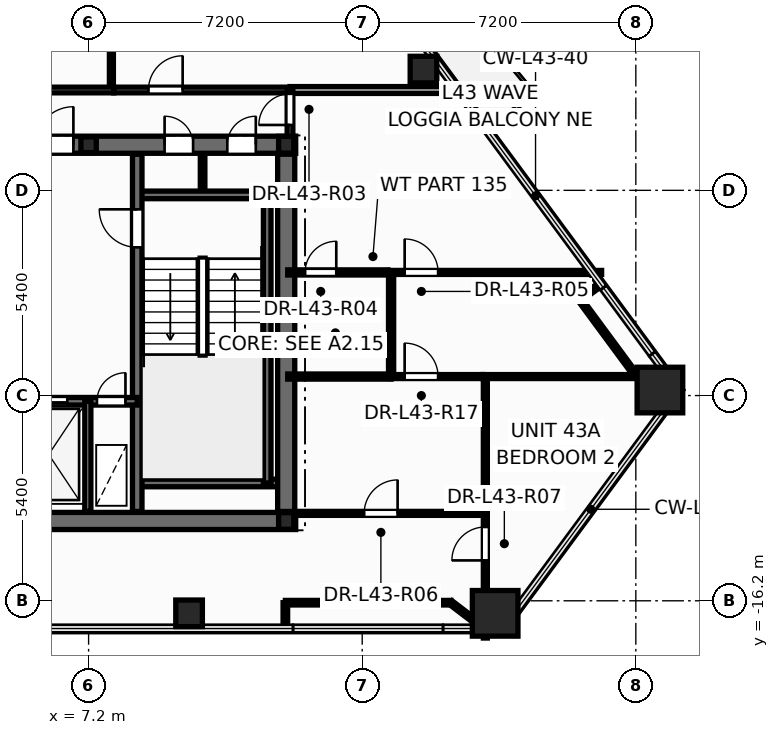
"""IFC4 building model, lengths in metres.
Left out: names, types, materials, properties, quantities, classifications, styles, units other than length and angle.
Written with IfcOpenShell. Run it as: python <this file> out.ifc"""

import sys

from ifc_helpers import new_model, si_unit, direction, frame, frame_2d, origin, origin_2d, place, context, subcontext, project, spatial, rectangle, hollow_rectangle, hollow_circle, i_section, extrude, element, fill, save


model = new_model("IFC4")
c1 = context("Model", 3, precision=1e-05, world=origin(), true_north=direction((0.0, 1.0)))
c2 = subcontext(c1, "Body", "Model", "MODEL_VIEW")
j1 = project(units=[si_unit("LENGTHUNIT", "METRE"), si_unit("PLANEANGLEUNIT", "RADIAN")], contexts=[c1])
p1 = place(None, origin())
s1 = spatial("IfcSite", under=j1, at=p1, CompositionType="ELEMENT")
p2 = place(p1, origin())
s2 = spatial("IfcBuilding", under=s1, at=p2, CompositionType="ELEMENT")
p3 = place(p2, frame((0.0, 0.0, 165.3)))
s3 = spatial("IfcBuildingStorey", under=s2, at=p3, CompositionType="ELEMENT", Elevation=165.3)
for number, where, z_axis, x_axis in (
    (1, (17.898, -16.53, 0.0), (0.0, 0.0, 1.0), (1.0, 0.0, 0.0)),
    (2, (22.234, -10.655, 0.0), (0.0, 0.0, 1.0), (1.0, 0.0, 0.0)),
):
    element("IfcColumn", number, at=place(p3, frame(where, z_axis=z_axis, x_axis=x_axis)), inside=s3, PredefinedType="COLUMN", context=c2, shape_type="SweptSolid", body=[
        extrude(hollow_rectangle(XDim=1.2, YDim=1.2, WallThickness=0.055, at=origin_2d()), origin(), (0.0, 0.0, 1.0), 3.6),
    ])
for number, where, z_axis, x_axis in (
    (3, (9.844, -16.53, 0.0), (0.0, 0.0, 1.0), (1.0, 0.0, 0.0)),
    (4, (16.012, -2.223, 0.0), (0.0, 0.0, 1.0), (1.0, 0.0, 0.0)),
):
    element("IfcColumn", number, at=place(p3, frame(where, z_axis=z_axis, x_axis=x_axis)), inside=s3, PredefinedType="COLUMN", context=c2, shape_type="SweptSolid", body=[
        extrude(hollow_circle(Radius=0.35, WallThickness=0.03, at=origin_2d()), origin(), (0.0, 0.0, 1.0), 3.6),
    ])
for number, where, z_axis, x_axis in (
    (5, (12.4, -14.1, 0.0), (0.0, 0.0, 1.0), (1.0, 0.0, 0.0)),
    (6, (12.4, -4.2, 0.0), (0.0, 0.0, 1.0), (1.0, 0.0, 0.0)),
):
    element("IfcColumn", number, at=place(p3, frame(where, z_axis=z_axis, x_axis=x_axis)), inside=s3, PredefinedType="COLUMN", context=c2, shape_type="SweptSolid", body=[
        extrude(i_section(OverallWidth=0.4, OverallDepth=0.44, WebThickness=0.028, FlangeThickness=0.04, at=origin_2d()), origin(), (0.0, 0.0, 1.0), 3.6),
    ])
p4 = place(p3, frame((7.2, -4.2, 0.0), z_axis=(0.0, 0.0, 1.0), x_axis=(1.0, 0.0, 0.0)))
e7 = element("IfcColumn", 7, at=p4, inside=s3, PredefinedType="PILASTER", context=c2, shape_type="SweptSolid", body=[
    extrude(i_section(OverallWidth=0.405, OverallDepth=0.414, WebThickness=0.022, FlangeThickness=0.032, at=origin_2d()), origin(), (0.0, 0.0, 1.0), 3.6),
])
p5 = place(p3, frame((10.2, -5.52, 0.0), z_axis=(0.0, 0.0, 1.0), x_axis=(0.0, 1.0, 0.0)))
e8 = element("IfcWall", 8, at=p5, inside=s3, PredefinedType="PARTITIONING", context=c2, shape_type="SweptSolid", body=[
    extrude(rectangle(XDim=1.12, YDim=0.12, at=frame_2d((0.56, 0.0))), origin(), (0.0, 0.0, 1.0), 3.28),
])
p6 = place(p3, frame((-12.65, -14.1, 0.0), z_axis=(0.0, 0.0, 1.0), x_axis=(1.0, 0.0, 0.0)))
e9 = element("IfcWall", 9, at=p6, inside=s3, PredefinedType="SHEAR", context=c2, shape_type="SweptSolid", body=[
    extrude(rectangle(XDim=25.3, YDim=0.45, at=frame_2d((12.65, 0.0))), origin(), (0.0, 0.0, 1.0), 3.6),
])
p7 = place(p3, frame((-12.65, -4.2, 0.0), z_axis=(0.0, 0.0, 1.0), x_axis=(1.0, 0.0, 0.0)))
e10 = element("IfcWall", 10, at=p7, inside=s3, PredefinedType="SHEAR", context=c2, shape_type="SweptSolid", body=[
    extrude(rectangle(XDim=25.3, YDim=0.45, at=frame_2d((12.65, 0.0))), origin(), (0.0, 0.0, 1.0), 3.6),
])
p8 = place(p7, frame((1.85, 0.0, 0.0)))
e11 = element("IfcOpeningElement", 11, at=p8, cuts=e10, PredefinedType="OPENING", context=c2, shape_type="SweptSolid", body=[
    extrude(rectangle(XDim=0.756, YDim=2.054, at=frame_2d((0.375, 1.027))), frame((0.0, 0.235, 0.0), z_axis=(0.0, -1.0, 0.0), x_axis=(1.0, 0.0, 0.0)), (0.0, 0.0, 1.0), 0.47),
])
p9 = place(p7, frame((21.85, 0.0, 0.0)))
e12 = element("IfcOpeningElement", 12, at=p9, cuts=e10, PredefinedType="OPENING", context=c2, shape_type="SweptSolid", body=[
    extrude(rectangle(XDim=0.756, YDim=2.054, at=frame_2d((0.375, 1.027))), frame((0.0, 0.235, 0.0), z_axis=(0.0, -1.0, 0.0), x_axis=(1.0, 0.0, 0.0)), (0.0, 0.0, 1.0), 0.47),
])
p10 = place(p7, frame((23.5, 0.0, 0.0)))
e13 = element("IfcOpeningElement", 13, at=p10, cuts=e10, PredefinedType="OPENING", context=c2, shape_type="SweptSolid", body=[
    extrude(rectangle(XDim=0.756, YDim=2.054, at=frame_2d((0.375, 1.027))), frame((0.0, 0.235, 0.0), z_axis=(0.0, -1.0, 0.0), x_axis=(1.0, 0.0, 0.0)), (0.0, 0.0, 1.0), 0.47),
])
p11 = place(p7, frame((5.85, 0.0, 0.0)))
e14 = element("IfcOpeningElement", 14, at=p11, cuts=e10, PredefinedType="OPENING", context=c2, shape_type="SweptSolid", body=[
    extrude(rectangle(XDim=1.006, YDim=2.104, at=frame_2d((0.5, 1.052))), frame((0.0, 0.235, 0.0), z_axis=(0.0, -1.0, 0.0), x_axis=(1.0, 0.0, 0.0)), (0.0, 0.0, 1.0), 0.47),
])
p12 = place(p7, frame((10.35, 0.0, 0.0)))
e15 = element("IfcOpeningElement", 15, at=p12, cuts=e10, PredefinedType="OPENING", context=c2, shape_type="SweptSolid", body=[
    extrude(rectangle(XDim=1.406, YDim=2.154, at=frame_2d((0.7, 1.077))), frame((0.0, 0.235, 0.0), z_axis=(0.0, -1.0, 0.0), x_axis=(1.0, 0.0, 0.0)), (0.0, 0.0, 1.0), 0.47),
])
p13 = place(p7, frame((18.45, 0.0, 0.0)))
e16 = element("IfcOpeningElement", 16, at=p13, cuts=e10, PredefinedType="OPENING", context=c2, shape_type="SweptSolid", body=[
    extrude(rectangle(XDim=1.006, YDim=2.104, at=frame_2d((0.5, 1.052))), frame((0.0, 0.235, 0.0), z_axis=(0.0, -1.0, 0.0), x_axis=(1.0, 0.0, 0.0)), (0.0, 0.0, 1.0), 0.47),
])
for number, where, z_axis, x_axis in (
    (17, (8.48, -5.52, 0.0), (0.0, 0.0, 1.0), (1.0, 0.0, 0.0)),
    (18, (8.48, -13.1, 0.0), (0.0, 0.0, 1.0), (1.0, 0.0, 0.0)),
):
    element("IfcWall", number, at=place(p3, frame(where, z_axis=z_axis, x_axis=x_axis)), inside=s3, PredefinedType="SOLIDWALL", context=c2, shape_type="SweptSolid", body=[
        extrude(rectangle(XDim=3.87, YDim=0.2, at=frame_2d((1.935, 0.0))), origin(), (0.0, 0.0, 1.0), 3.6),
    ])
p14 = place(p3, frame((11.9, -13.1, 0.0), z_axis=(0.0, 0.0, 1.0), x_axis=(0.0, 1.0, 0.0)))
e19 = element("IfcWall", 19, at=p14, inside=s3, PredefinedType="SOLIDWALL", context=c2, shape_type="SweptSolid", body=[
    extrude(rectangle(XDim=7.58, YDim=0.2, at=frame_2d((3.79, 0.0))), origin(), (0.0, 0.0, 1.0), 3.6),
])
p15 = place(p3, frame((8.48, -13.85, 0.0), z_axis=(0.0, 0.0, 1.0), x_axis=(0.0, 1.0, 0.0)))
e20 = element("IfcWall", 20, at=p15, inside=s3, PredefinedType="SHEAR", context=c2, shape_type="SweptSolid", body=[
    extrude(rectangle(XDim=9.4, YDim=0.25, at=frame_2d((4.7, 0.0))), origin(), (0.0, 0.0, 1.0), 3.6),
])
p16 = place(p15, frame((6.95, 0.0, 0.0)))
e21 = element("IfcOpeningElement", 21, at=p16, cuts=e20, PredefinedType="OPENING", context=c2, shape_type="SweptSolid", body=[
    extrude(rectangle(XDim=1.006, YDim=2.104, at=frame_2d((0.5, 1.052))), frame((0.0, 0.135, 0.0), z_axis=(0.0, -1.0, 0.0), x_axis=(1.0, 0.0, 0.0)), (0.0, 0.0, 1.0), 0.27),
])
p17 = place(p3, frame((5.12, -10.95, 0.0), z_axis=(0.0, 0.0, 1.0), x_axis=(1.0, 0.0, 0.0)))
e22 = element("IfcWall", 22, at=p17, inside=s3, PredefinedType="SOLIDWALL", context=c2, shape_type="SweptSolid", body=[
    extrude(rectangle(XDim=3.36, YDim=0.2, at=frame_2d((1.68, 0.0))), origin(), (0.0, 0.0, 1.0), 3.6),
])
p18 = place(p17, frame((0.42, 0.0, 0.0)))
e23 = element("IfcOpeningElement", 23, at=p18, cuts=e22, PredefinedType="OPENING", context=c2, shape_type="SweptSolid", body=[
    extrude(rectangle(XDim=1.106, YDim=2.104, at=frame_2d((0.55, 1.052))), frame((0.0, 0.11, 0.0), z_axis=(0.0, -1.0, 0.0), x_axis=(1.0, 0.0, 0.0)), (0.0, 0.0, 1.0), 0.22),
])
p19 = place(p17, frame((2.3, 0.0, 0.0)))
e24 = element("IfcOpeningElement", 24, at=p19, cuts=e22, PredefinedType="OPENING", context=c2, shape_type="SweptSolid", body=[
    extrude(rectangle(XDim=0.756, YDim=2.054, at=frame_2d((0.375, 1.027))), frame((0.0, 0.11, 0.0), z_axis=(0.0, -1.0, 0.0), x_axis=(1.0, 0.0, 0.0)), (0.0, 0.0, 1.0), 0.22),
])
p20 = place(p3, frame((7.18, -13.85, 0.0), z_axis=(0.0, 0.0, 1.0), x_axis=(0.0, 1.0, 0.0)))
e25 = element("IfcWall", 25, at=p20, inside=s3, PredefinedType="PARTITIONING", context=c2, shape_type="SweptSolid", body=[
    extrude(rectangle(XDim=2.9, YDim=0.16, at=frame_2d((1.45, 0.0))), origin(), (0.0, 0.0, 1.0), 2.405),
])
p21 = place(p3, frame((12.4, -13.85, 0.0), z_axis=(0.0, 0.0, 1.0), x_axis=(0.0, 1.0, 0.0)))
e26 = element("IfcWall", 26, at=p21, inside=s3, PredefinedType="SHEAR", context=c2, shape_type="SweptSolid", body=[
    extrude(rectangle(XDim=9.4, YDim=0.45, at=frame_2d((4.7, 0.0))), origin(), (0.0, 0.0, 1.0), 3.6),
])
p22 = place(p3, frame((7.8, -2.76, 0.0), z_axis=(0.0, 0.0, 1.0), x_axis=(0.0, 1.0, 0.0)))
e27 = element("IfcWall", 27, at=p22, inside=s3, PredefinedType="PARTITIONING", context=c2, shape_type="SweptSolid", body=[
    extrude(rectangle(XDim=12.338, YDim=0.105, at=frame_2d((6.169, 0.0))), origin(), (0.0, 0.0, 1.0), 2.547),
])
p23 = place(p3, frame((15.08, -7.56, 0.0), z_axis=(0.0, 0.0, 1.0), x_axis=(1.0, 0.0, 0.0)))
e28 = element("IfcWall", 28, at=p23, inside=s3, PredefinedType="PARTITIONING", context=c2, shape_type="SweptSolid", body=[
    extrude(rectangle(XDim=5.62, YDim=0.105, at=frame_2d((2.81, 0.0))), origin(), (0.0, 0.0, 1.0), 2.255),
])
p24 = place(p23, frame((0.437, 0.0, 0.0)))
e29 = element("IfcOpeningElement", 29, at=p24, cuts=e28, PredefinedType="OPENING", context=c2, shape_type="SweptSolid", body=[
    extrude(rectangle(XDim=0.886, YDim=2.104, at=frame_2d((0.44, 1.052))), frame((0.0, 0.062, 0.0), z_axis=(0.0, -1.0, 0.0), x_axis=(1.0, 0.0, 0.0)), (0.0, 0.0, 1.0), 0.125),
])
p25 = place(p3, frame((2.36, -2.76, 0.0), z_axis=(0.0, 0.0, 1.0), x_axis=(1.0, 0.0, 0.0)))
e30 = element("IfcWall", 30, at=p25, inside=s3, PredefinedType="PARTITIONING", context=c2, shape_type="SweptSolid", body=[
    extrude(rectangle(XDim=5.5, YDim=0.15, at=frame_2d((2.75, 0.0))), origin(), (0.0, 0.0, 1.0), 2.255),
])
p26 = place(p3, frame((12.652, -13.9, 0.0), z_axis=(0.0, 0.0, 1.0), x_axis=(1.0, 0.0, 0.0)))
e31 = element("IfcWall", 31, at=p26, inside=s3, PredefinedType="PARTITIONING", context=c2, shape_type="SweptSolid", body=[
    extrude(rectangle(XDim=4.988, YDim=0.105, at=frame_2d((2.494, 0.0))), origin(), (0.0, 0.0, 1.0), 3.28),
])
p27 = place(p26, frame((1.8, 0.0, 0.0)))
e32 = element("IfcOpeningElement", 32, at=p27, cuts=e31, PredefinedType="OPENING", context=c2, shape_type="SweptSolid", body=[
    extrude(rectangle(XDim=0.886, YDim=2.104, at=frame_2d((0.44, 1.052))), frame((0.0, 0.062, 0.0), z_axis=(0.0, -1.0, 0.0), x_axis=(1.0, 0.0, 0.0)), (0.0, 0.0, 1.0), 0.125),
])
p28 = place(p3, frame((7.862, -2.76, 0.0), z_axis=(0.0, 0.0, 1.0), x_axis=(1.0, 0.0, 0.0)))
e33 = element("IfcWall", 33, at=p28, inside=s3, PredefinedType="PARTITIONING", context=c2, shape_type="SweptSolid", body=[
    extrude(rectangle(XDim=4.638, YDim=0.15, at=frame_2d((2.319, 0.0))), origin(), (0.0, 0.0, 1.0), 3.28),
])
p29 = place(p28, frame((0.913, 0.0, 0.0)))
e34 = element("IfcOpeningElement", 34, at=p29, cuts=e33, PredefinedType="OPENING", context=c2, shape_type="SweptSolid", body=[
    extrude(rectangle(XDim=0.906, YDim=2.104, at=frame_2d((0.45, 1.052))), frame((0.0, 0.085, 0.0), z_axis=(0.0, -1.0, 0.0), x_axis=(1.0, 0.0, 0.0)), (0.0, 0.0, 1.0), 0.17),
])
p30 = place(p3, frame((17.58, -10.3, 0.0), z_axis=(0.0, 0.0, 1.0), x_axis=(1.0, 0.0, 0.0)))
e35 = element("IfcWall", 35, at=p30, inside=s3, PredefinedType="PARTITIONING", context=c2, shape_type="SweptSolid", body=[
    extrude(rectangle(XDim=4.64, YDim=0.105, at=frame_2d((2.32, 0.0))), origin(), (0.0, 0.0, 1.0), 2.255),
])
p31 = place(p3, frame((12.5, -2.76, 0.0), z_axis=(0.0, 0.0, 1.0), x_axis=(1.0, 0.0, 0.0)))
e36 = element("IfcWall", 36, at=p31, inside=s3, PredefinedType="PARTITIONING", context=c2, shape_type="SweptSolid", body=[
    extrude(rectangle(XDim=4.405, YDim=0.18, at=frame_2d((2.203, 0.0))), origin(), (0.0, 0.0, 1.0), 2.722),
])
p32 = place(p3, frame((12.378, -16.25, 0.0), z_axis=(0.0, 0.0, 1.0), x_axis=(1.0, 0.0, 0.0)))
e37 = element("IfcWall", 37, at=p32, inside=s3, PredefinedType="PARTITIONING", context=c2, shape_type="SweptSolid", body=[
    extrude(rectangle(XDim=4.354, YDim=0.12, at=frame_2d((2.177, 0.0))), origin(), (0.0, 0.0, 1.0), 3.28),
])
p33 = place(p3, frame((17.64, -13.9, 0.0), z_axis=(0.0, 0.0, 1.0), x_axis=(0.0, 1.0, 0.0)))
e38 = element("IfcWall", 38, at=p33, inside=s3, PredefinedType="PARTITIONING", context=c2, shape_type="SweptSolid", body=[
    extrude(rectangle(XDim=3.6, YDim=0.105, at=frame_2d((1.8, 0.0))), origin(), (0.0, 0.0, 1.0), 3.28),
])
p34 = place(p3, frame((17.64, -17.18, 0.0), z_axis=(0.0, 0.0, 1.0), x_axis=(0.0, 1.0, 0.0)))
e39 = element("IfcWall", 39, at=p34, inside=s3, PredefinedType="PARTITIONING", context=c2, shape_type="SweptSolid", body=[
    extrude(rectangle(XDim=3.28, YDim=0.105, at=frame_2d((1.64, 0.0))), origin(), (0.0, 0.0, 1.0), 2.722),
])
p35 = place(p34, frame((2.042, 0.0, 0.0)))
e40 = element("IfcOpeningElement", 40, at=p35, cuts=e39, PredefinedType="OPENING", context=c2, shape_type="SweptSolid", body=[
    extrude(rectangle(XDim=0.886, YDim=2.104, at=frame_2d((0.44, 1.052))), frame((0.0, 0.062, 0.0), z_axis=(0.0, -1.0, 0.0), x_axis=(1.0, 0.0, 0.0)), (0.0, 0.0, 1.0), 0.125),
])
p36 = place(p3, frame((12.44, -7.56, 0.0), z_axis=(0.0, 0.0, 1.0), x_axis=(1.0, 0.0, 0.0)))
e41 = element("IfcWall", 41, at=p36, inside=s3, PredefinedType="PARTITIONING", context=c2, shape_type="SweptSolid", body=[
    extrude(rectangle(XDim=2.638, YDim=0.135, at=frame_2d((1.319, 0.0))), origin(), (0.0, 0.0, 1.0), 2.722),
])
p37 = place(p36, frame((0.458, 0.0, 0.0)))
e42 = element("IfcOpeningElement", 42, at=p37, cuts=e41, PredefinedType="OPENING", context=c2, shape_type="SweptSolid", body=[
    extrude(rectangle(XDim=0.826, YDim=2.104, at=frame_2d((0.41, 1.052))), frame((0.0, 0.078, 0.0), z_axis=(0.0, -1.0, 0.0), x_axis=(1.0, 0.0, 0.0)), (0.0, 0.0, 1.0), 0.155),
])
p38 = place(p3, frame((15.16, -10.3, 0.0), z_axis=(0.0, 0.0, 1.0), x_axis=(0.0, 1.0, 0.0)))
e43 = element("IfcWall", 43, at=p38, inside=s3, PredefinedType="PARTITIONING", context=c2, shape_type="SweptSolid", body=[
    extrude(rectangle(XDim=2.74, YDim=0.135, at=frame_2d((1.37, 0.0))), origin(), (0.0, 0.0, 1.0), 3.28),
])
p39 = place(p3, frame((12.44, -10.3, 0.0), z_axis=(0.0, 0.0, 1.0), x_axis=(1.0, 0.0, 0.0)))
e44 = element("IfcWall", 44, at=p39, inside=s3, PredefinedType="PARTITIONING", context=c2, shape_type="SweptSolid", body=[
    extrude(rectangle(XDim=2.72, YDim=0.135, at=frame_2d((1.36, 0.0))), origin(), (0.0, 0.0, 1.0), 2.722),
])
p40 = place(p3, frame((15.16, -10.3, 0.0), z_axis=(0.0, 0.0, 1.0), x_axis=(1.0, 0.0, 0.0)))
e45 = element("IfcWall", 45, at=p40, inside=s3, PredefinedType="PARTITIONING", context=c2, shape_type="SweptSolid", body=[
    extrude(rectangle(XDim=2.418, YDim=0.105, at=frame_2d((1.209, 0.0))), origin(), (0.0, 0.0, 1.0), 3.28),
])
p41 = place(p40, frame((0.357, 0.0, 0.0)))
e46 = element("IfcOpeningElement", 46, at=p41, cuts=e45, PredefinedType="OPENING", context=c2, shape_type="SweptSolid", body=[
    extrude(rectangle(XDim=0.886, YDim=2.104, at=frame_2d((0.44, 1.052))), frame((0.0, 0.062, 0.0), z_axis=(0.0, -1.0, 0.0), x_axis=(1.0, 0.0, 0.0)), (0.0, 0.0, 1.0), 0.125),
])
p42 = place(p3, frame((21.554, -10.205, 0.0), z_axis=(0.0, 0.0, 1.0), x_axis=(-0.593742732842, 0.804654936726, 0.0)))
e47 = element("IfcWall", 47, at=p42, inside=s3, PredefinedType="PARTITIONING", context=c2, shape_type="SweptSolid", body=[
    extrude(rectangle(XDim=2.404, YDim=0.12, at=frame_2d((1.202, 0.0))), origin(), (0.0, 0.0, 1.0), 2.255),
])
p43 = place(p3, frame((12.5, -4.24, 0.0), z_axis=(0.0, 0.0, 1.0), x_axis=(0.0, 1.0, 0.0)))
e48 = element("IfcWall", 48, at=p43, inside=s3, PredefinedType="PARTITIONING", context=c2, shape_type="SweptSolid", body=[
    extrude(rectangle(XDim=1.48, YDim=0.15, at=frame_2d((0.74, 0.0))), origin(), (0.0, 0.0, 1.0), 2.255),
])
p44 = place(p43, frame((0.56, 0.0, 0.0)))
e49 = element("IfcOpeningElement", 49, at=p44, cuts=e48, PredefinedType="OPENING", context=c2, shape_type="SweptSolid", body=[
    extrude(rectangle(XDim=0.826, YDim=2.104, at=frame_2d((0.41, 1.052))), frame((0.0, 0.085, 0.0), z_axis=(0.0, -1.0, 0.0), x_axis=(1.0, 0.0, 0.0)), (0.0, 0.0, 1.0), 0.17),
])
p45 = place(p3, frame((16.731, -16.25, 0.0), z_axis=(0.0, 0.0, 1.0), x_axis=(0.794820504859, -0.606844597122, 0.0)))
e50 = element("IfcWall", 50, at=p45, inside=s3, PredefinedType="PARTITIONING", context=c2, shape_type="SweptSolid", body=[
    extrude(rectangle(XDim=0.853, YDim=0.12, at=frame_2d((0.427, 0.0))), origin(), (0.0, 0.0, 1.0), 2.722),
])
for number, where, z_axis, x_axis in (
    (51, (20.127, -8.271, 0.0), (0.0, 0.0, 1.0), (0.805, 0.594, 0.0)),
    (52, (12.378, -16.92, 0.0), (0.0, 0.0, 1.0), (0.0, 1.0, 0.0)),
):
    element("IfcWall", number, at=place(p3, frame(where, z_axis=z_axis, x_axis=x_axis)), inside=s3, PredefinedType="PARTITIONING", context=c2, shape_type="SweptSolid", body=[
        extrude(rectangle(XDim=0.67, YDim=0.12, at=frame_2d((0.335, 0.0))), origin(), (0.0, 0.0, 1.0), 2.722),
    ])
p46 = place(p16, origin())
e53 = element("IfcDoor", 53, at=p46, inside=s3, OperationType="SINGLE_SWING_RIGHT", PredefinedType="DOOR", context=c2, shape_type="SweptSolid", body=[
    extrude(rectangle(XDim=1.0, YDim=2.1, at=frame_2d((0.5, 1.05))), frame((0.0, 0.025, 0.0), z_axis=(0.0, -1.0, 0.0), x_axis=(1.0, 0.0, 0.0)), (0.0, 0.0, 1.0), 0.05),
])
fill(e21, e53)
p47 = place(p18, origin())
e54 = element("IfcDoor", 54, at=p47, inside=s3, OperationType="DOUBLE_DOOR_SLIDING", PredefinedType="DOOR", context=c2, shape_type="SweptSolid", body=[
    extrude(rectangle(XDim=1.1, YDim=2.1, at=frame_2d((0.55, 1.05))), frame((0.0, 0.025, 0.0), z_axis=(0.0, -1.0, 0.0), x_axis=(1.0, 0.0, 0.0)), (0.0, 0.0, 1.0), 0.05),
])
fill(e23, e54)
p48 = place(p19, origin())
e55 = element("IfcDoor", 55, at=p48, inside=s3, OperationType="SINGLE_SWING_RIGHT", PredefinedType="DOOR", context=c2, shape_type="SweptSolid", body=[
    extrude(rectangle(XDim=0.75, YDim=2.05, at=frame_2d((0.375, 1.025))), frame((0.0, 0.025, 0.0), z_axis=(0.0, -1.0, 0.0), x_axis=(1.0, 0.0, 0.0)), (0.0, 0.0, 1.0), 0.05),
])
fill(e24, e55)
p49 = place(p9, origin())
e56 = element("IfcDoor", 56, at=p49, inside=s3, OperationType="SINGLE_SWING_LEFT", PredefinedType="DOOR", context=c2, shape_type="SweptSolid", body=[
    extrude(rectangle(XDim=0.75, YDim=2.05, at=frame_2d((0.375, 1.025))), frame((0.0, 0.025, 0.0), z_axis=(0.0, -1.0, 0.0), x_axis=(1.0, 0.0, 0.0)), (0.0, 0.0, 1.0), 0.05),
])
fill(e12, e56)
p50 = place(p10, origin())
e57 = element("IfcDoor", 57, at=p50, inside=s3, OperationType="SINGLE_SWING_RIGHT", PredefinedType="DOOR", context=c2, shape_type="SweptSolid", body=[
    extrude(rectangle(XDim=0.75, YDim=2.05, at=frame_2d((0.375, 1.025))), frame((0.0, 0.025, 0.0), z_axis=(0.0, -1.0, 0.0), x_axis=(1.0, 0.0, 0.0)), (0.0, 0.0, 1.0), 0.05),
])
fill(e13, e57)
p51 = place(p13, origin())
e58 = element("IfcDoor", 58, at=p51, inside=s3, OperationType="SINGLE_SWING_RIGHT", PredefinedType="DOOR", context=c2, shape_type="SweptSolid", body=[
    extrude(rectangle(XDim=1.0, YDim=2.1, at=frame_2d((0.5, 1.05))), frame((0.0, 0.025, 0.0), z_axis=(0.0, -1.0, 0.0), x_axis=(1.0, 0.0, 0.0)), (0.0, 0.0, 1.0), 0.05),
])
fill(e16, e58)
p52 = place(p44, origin())
e59 = element("IfcDoor", 59, at=p52, inside=s3, OperationType="SINGLE_SWING_LEFT", PredefinedType="DOOR", context=c2, shape_type="SweptSolid", body=[
    extrude(rectangle(XDim=0.82, YDim=2.1, at=frame_2d((0.41, 1.05))), frame((0.0, 0.025, 0.0), z_axis=(0.0, -1.0, 0.0), x_axis=(1.0, 0.0, 0.0)), (0.0, 0.0, 1.0), 0.05),
])
fill(e49, e59)
p53 = place(p37, origin())
e60 = element("IfcDoor", 60, at=p53, inside=s3, OperationType="SINGLE_SWING_RIGHT", PredefinedType="DOOR", context=c2, shape_type="SweptSolid", body=[
    extrude(rectangle(XDim=0.82, YDim=2.1, at=frame_2d((0.41, 1.05))), frame((0.0, 0.025, 0.0), z_axis=(0.0, -1.0, 0.0), x_axis=(1.0, 0.0, 0.0)), (0.0, 0.0, 1.0), 0.05),
])
fill(e42, e60)
p54 = place(p24, origin())
e61 = element("IfcDoor", 61, at=p54, inside=s3, OperationType="SINGLE_SWING_LEFT", PredefinedType="DOOR", context=c2, shape_type="SweptSolid", body=[
    extrude(rectangle(XDim=0.88, YDim=2.1, at=frame_2d((0.44, 1.05))), frame((0.0, 0.025, 0.0), z_axis=(0.0, -1.0, 0.0), x_axis=(1.0, 0.0, 0.0)), (0.0, 0.0, 1.0), 0.05),
])
fill(e29, e61)
p55 = place(p27, origin())
e62 = element("IfcDoor", 62, at=p55, inside=s3, OperationType="SINGLE_SWING_RIGHT", PredefinedType="DOOR", context=c2, shape_type="SweptSolid", body=[
    extrude(rectangle(XDim=0.88, YDim=2.1, at=frame_2d((0.44, 1.05))), frame((0.0, 0.025, 0.0), z_axis=(0.0, -1.0, 0.0), x_axis=(1.0, 0.0, 0.0)), (0.0, 0.0, 1.0), 0.05),
])
fill(e32, e62)
p56 = place(p35, origin())
e63 = element("IfcDoor", 63, at=p56, inside=s3, OperationType="SINGLE_SWING_LEFT", PredefinedType="DOOR", context=c2, shape_type="SweptSolid", body=[
    extrude(rectangle(XDim=0.88, YDim=2.1, at=frame_2d((0.44, 1.05))), frame((0.0, 0.025, 0.0), z_axis=(0.0, -1.0, 0.0), x_axis=(1.0, 0.0, 0.0)), (0.0, 0.0, 1.0), 0.05),
])
fill(e40, e63)
p57 = place(p29, origin())
e64 = element("IfcDoor", 64, at=p57, inside=s3, OperationType="SINGLE_SWING_RIGHT", PredefinedType="DOOR", context=c2, shape_type="SweptSolid", body=[
    extrude(rectangle(XDim=0.9, YDim=2.1, at=frame_2d((0.45, 1.05))), frame((0.0, 0.025, 0.0), z_axis=(0.0, -1.0, 0.0), x_axis=(1.0, 0.0, 0.0)), (0.0, 0.0, 1.0), 0.05),
])
fill(e34, e64)
p58 = place(p41, origin())
e65 = element("IfcDoor", 65, at=p58, inside=s3, OperationType="SINGLE_SWING_LEFT", PredefinedType="DOOR", context=c2, shape_type="SweptSolid", body=[
    extrude(rectangle(XDim=0.88, YDim=2.1, at=frame_2d((0.44, 1.05))), frame((0.0, 0.025, 0.0), z_axis=(0.0, -1.0, 0.0), x_axis=(1.0, 0.0, 0.0)), (0.0, 0.0, 1.0), 0.05),
])
fill(e46, e65)
save(model, sys.argv[1])
